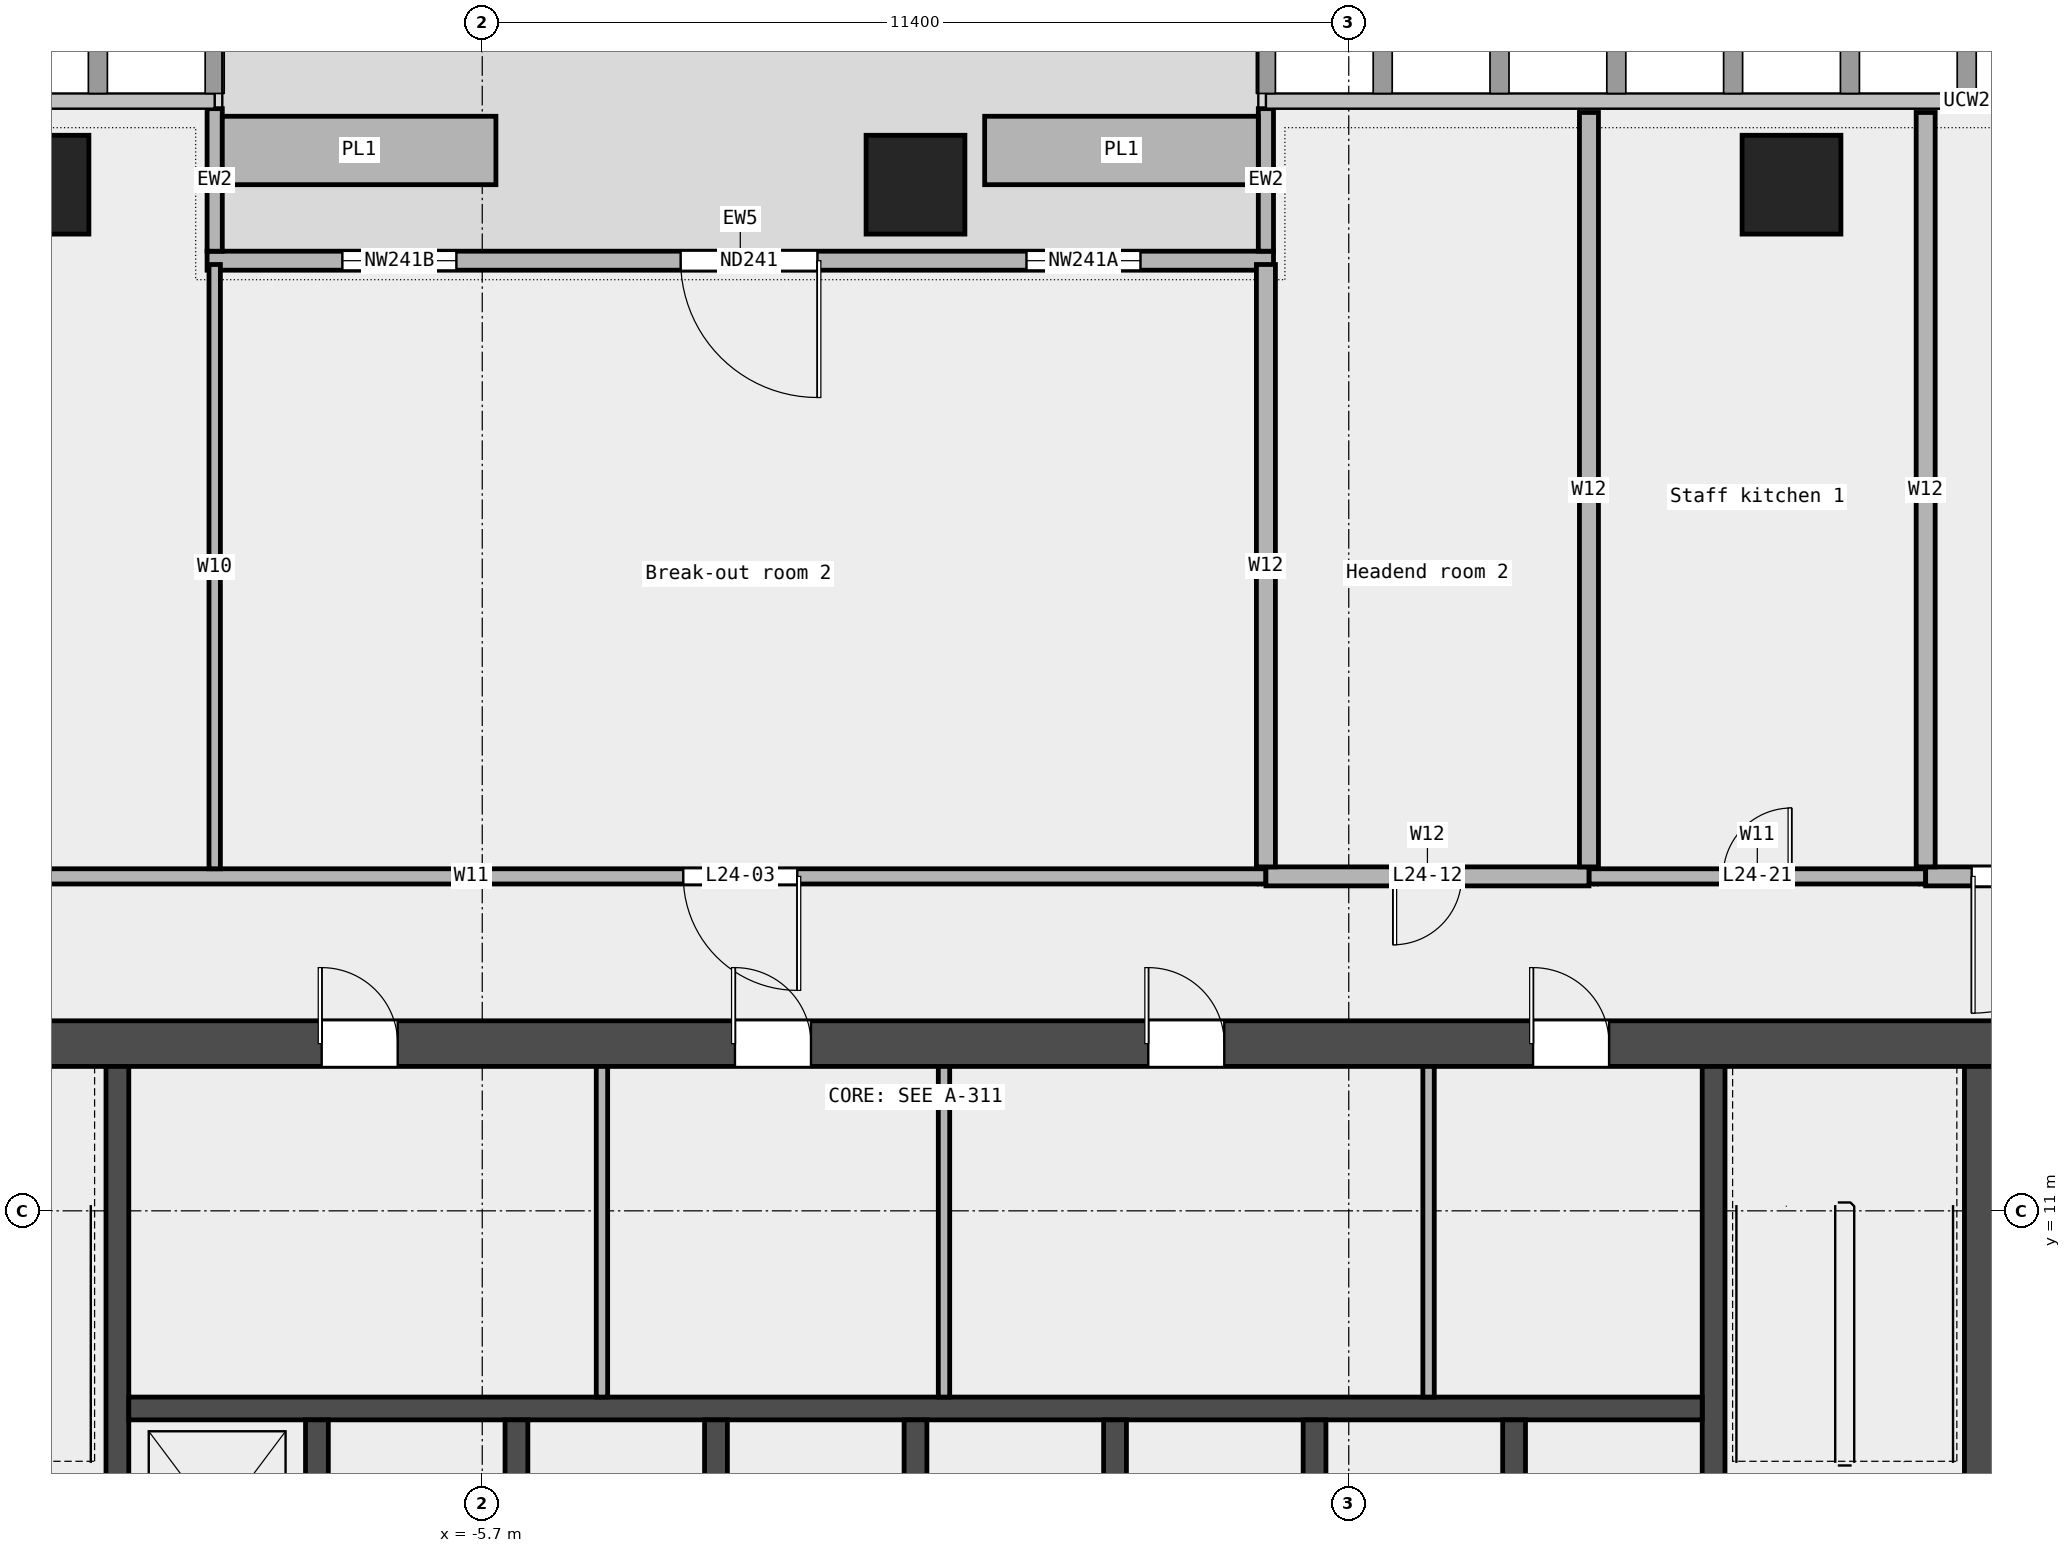
"""IFC4 building model, lengths in metres.
Left out: names, types, materials, properties, quantities, classifications, styles, units other than length and angle.
Written with IfcOpenShell. Run it as: python <this file> out.ifc"""

import sys

from ifc_helpers import new_model, si_unit, direction, frame, frame_2d, origin, origin_2d, place, context, subcontext, project, spatial, rectangle, extrude, element, fill, save


model = new_model("IFC4")
c1 = context("Model", 3, precision=1e-05, world=origin(), true_north=direction((0.0, 1.0)))
c2 = subcontext(c1, "Body", "Model", "MODEL_VIEW")
j1 = project(units=[si_unit("LENGTHUNIT", "METRE"), si_unit("PLANEANGLEUNIT", "RADIAN")], contexts=[c1])
p1 = place(None, origin())
s1 = spatial("IfcSite", under=j1, at=p1, CompositionType="ELEMENT")
p2 = place(p1, origin())
s2 = spatial("IfcBuilding", under=s1, at=p2, CompositionType="ELEMENT")
p3 = place(p2, frame((0.0, 0.0, 121.6)))
s3 = spatial("IfcBuildingStorey", under=s2, at=p3, CompositionType="ELEMENT", Elevation=121.6)
for number, where, z_axis, x_axis in (
    (1, (11.525, 24.5, 0.0), (0.0, 0.0, 1.0), (1.0, 0.0, 0.0)),
    (2, (0.0, 24.5, 0.0), (0.0, 0.0, 1.0), (1.0, 0.0, 0.0)),
    (3, (-11.525, 24.5, 0.0), (0.0, 0.0, 1.0), (1.0, 0.0, 0.0)),
):
    element("IfcColumn", number, at=place(p3, frame(where, z_axis=z_axis, x_axis=x_axis)), inside=s3, PredefinedType="COLUMN", context=c2, shape_type="SweptSolid", body=[
        extrude(rectangle(XDim=1.3, YDim=1.3, at=origin_2d()), origin(), (0.0, 0.0, 1.0), 4.05),
    ])
p4 = place(p3, frame((4.71, 23.5, 0.0), z_axis=(0.0, 0.0, 1.0), x_axis=(-1.0, 0.0, 0.0)))
e4 = element("IfcWall", 4, at=p4, inside=s3, PredefinedType="STANDARD", context=c2, shape_type="SweptSolid", body=[
    extrude(rectangle(XDim=14.03, YDim=0.25, at=frame_2d((7.015, 0.0))), origin(), (0.0, 0.0, 1.0), 4.05),
])
p5 = place(p4, frame((1.75, 0.0, 0.45)))
e5 = element("IfcOpeningElement", 5, at=p5, cuts=e4, PredefinedType="OPENING", context=c2, shape_type="SweptSolid", body=[
    extrude(rectangle(XDim=1.5, YDim=3.0, at=frame_2d((0.75, 1.5))), frame((0.0, 0.137, 0.0), z_axis=(0.0, -1.0, 0.0), x_axis=(1.0, 0.0, 0.0)), (0.0, 0.0, 1.0), 0.274),
])
p6 = place(p4, frame((6.0, 0.0, 0.0)))
e6 = element("IfcOpeningElement", 6, at=p6, cuts=e4, PredefinedType="OPENING", context=c2, shape_type="SweptSolid", body=[
    extrude(rectangle(XDim=1.8, YDim=2.4, at=frame_2d((0.9, 1.2))), frame((0.0, 0.137, 0.0), z_axis=(0.0, -1.0, 0.0), x_axis=(1.0, 0.0, 0.0)), (0.0, 0.0, 1.0), 0.274),
])
p7 = place(p4, frame((10.75, 0.0, 0.45)))
e7 = element("IfcOpeningElement", 7, at=p7, cuts=e4, PredefinedType="OPENING", context=c2, shape_type="SweptSolid", body=[
    extrude(rectangle(XDim=1.5, YDim=3.0, at=frame_2d((0.75, 1.5))), frame((0.0, 0.137, 0.0), z_axis=(0.0, -1.0, 0.0), x_axis=(1.0, 0.0, 0.0)), (0.0, 0.0, 1.0), 0.274),
])
for number, where, z_axis, x_axis in (
    (8, (4.61, 25.5, 0.0), (0.0, 0.0, 1.0), (0.0, -1.0, 0.0)),
    (9, (-9.22, 25.5, 0.0), (0.0, 0.0, 1.0), (0.0, -1.0, 0.0)),
):
    element("IfcWall", number, at=place(p3, frame(where, z_axis=z_axis, x_axis=x_axis)), inside=s3, PredefinedType="STANDARD", context=c2, shape_type="SweptSolid", body=[
        extrude(rectangle(XDim=1.875, YDim=0.2, at=frame_2d((0.938, 0.0))), origin(), (0.0, 0.0, 1.0), 4.05),
    ])
for number, where, z_axis, x_axis in (
    (10, (4.51, 24.95, 0.0), (0.0, 0.0, 1.0), (-1.0, 0.0, 0.0)),
    (11, (-5.52, 24.95, 0.0), (0.0, 0.0, 1.0), (-1.0, 0.0, 0.0)),
):
    element("IfcWall", number, at=place(p3, frame(where, z_axis=z_axis, x_axis=x_axis)), inside=s3, PredefinedType="STANDARD", context=c2, shape_type="SweptSolid", body=[
        extrude(rectangle(XDim=3.6, YDim=0.9, at=frame_2d((1.8, 0.0))), origin(), (0.0, 0.0, 1.0), 0.7),
    ])
p8 = place(p3, frame((-16.3, 15.4, 0.0), z_axis=(0.0, 0.0, 1.0), x_axis=(1.0, 0.0, 0.0)))
e12 = element("IfcWall", 12, at=p8, inside=s3, PredefinedType="PARTITIONING", context=c2, shape_type="SweptSolid", body=[
    extrude(rectangle(XDim=20.91, YDim=0.2, at=frame_2d((10.455, 0.0))), origin(), (0.0, 0.0, 1.0), 4.05),
])
p9 = place(p8, frame((13.245, 0.0, 0.0)))
e13 = element("IfcOpeningElement", 13, at=p9, cuts=e12, PredefinedType="OPENING", context=c2, shape_type="SweptSolid", body=[
    extrude(rectangle(XDim=1.5, YDim=2.1, at=frame_2d((0.75, 1.05))), frame((0.0, 0.112, 0.0), z_axis=(0.0, -1.0, 0.0), x_axis=(1.0, 0.0, 0.0)), (0.0, 0.0, 1.0), 0.224),
])
p10 = place(p8, frame((2.387, 0.0, 0.0)))
e14 = element("IfcOpeningElement", 14, at=p10, cuts=e12, PredefinedType="OPENING", context=c2, shape_type="SweptSolid", body=[
    extrude(rectangle(XDim=1.2, YDim=2.1, at=frame_2d((0.6, 1.05))), frame((0.0, 0.112, 0.0), z_axis=(0.0, -1.0, 0.0), x_axis=(1.0, 0.0, 0.0)), (0.0, 0.0, 1.0), 0.224),
])
p11 = place(p3, frame((8.86, 15.4, 0.0), z_axis=(0.0, 0.0, 1.0), x_axis=(1.0, 0.0, 0.0)))
e15 = element("IfcWall", 15, at=p11, inside=s3, PredefinedType="PARTITIONING", context=c2, shape_type="SweptSolid", body=[
    extrude(rectangle(XDim=4.43, YDim=0.2, at=frame_2d((2.215, 0.0))), origin(), (0.0, 0.0, 1.0), 4.05),
])
p12 = place(p11, frame((1.765, 0.0, 0.0)))
e16 = element("IfcOpeningElement", 16, at=p12, cuts=e15, PredefinedType="OPENING", context=c2, shape_type="SweptSolid", body=[
    extrude(rectangle(XDim=0.9, YDim=2.1, at=frame_2d((0.45, 1.05))), frame((0.0, 0.112, 0.0), z_axis=(0.0, -1.0, 0.0), x_axis=(1.0, 0.0, 0.0)), (0.0, 0.0, 1.0), 0.224),
])
p13 = place(p3, frame((4.61, 15.4, 0.0), z_axis=(0.0, 0.0, 1.0), x_axis=(1.0, 0.0, 0.0)))
e17 = element("IfcWall", 17, at=p13, inside=s3, PredefinedType="PARTITIONING", context=c2, shape_type="SweptSolid", body=[
    extrude(rectangle(XDim=4.25, YDim=0.25, at=frame_2d((2.125, 0.0))), origin(), (0.0, 0.0, 1.0), 4.05),
])
p14 = place(p13, frame((1.675, 0.0, 0.0)))
e18 = element("IfcOpeningElement", 18, at=p14, cuts=e17, PredefinedType="OPENING", context=c2, shape_type="SweptSolid", body=[
    extrude(rectangle(XDim=0.9, YDim=2.1, at=frame_2d((0.45, 1.05))), frame((0.0, 0.137, 0.0), z_axis=(0.0, -1.0, 0.0), x_axis=(1.0, 0.0, 0.0)), (0.0, 0.0, 1.0), 0.274),
])
p15 = place(p3, frame((13.29, 15.4, 0.0), z_axis=(0.0, 0.0, 1.0), x_axis=(1.0, 0.0, 0.0)))
e19 = element("IfcWall", 19, at=p15, inside=s3, PredefinedType="PARTITIONING", context=c2, shape_type="SweptSolid", body=[
    extrude(rectangle(XDim=3.01, YDim=0.25, at=frame_2d((1.505, 0.0))), origin(), (0.0, 0.0, 1.0), 4.05),
])
p16 = place(p15, frame((0.605, 0.0, 0.0)))
e20 = element("IfcOpeningElement", 20, at=p16, cuts=e19, PredefinedType="OPENING", context=c2, shape_type="SweptSolid", body=[
    extrude(rectangle(XDim=1.8, YDim=2.1, at=frame_2d((0.9, 1.05))), frame((0.0, 0.137, 0.0), z_axis=(0.0, -1.0, 0.0), x_axis=(1.0, 0.0, 0.0)), (0.0, 0.0, 1.0), 0.274),
])
p17 = place(p3, frame((-9.22, 15.5, 0.0), z_axis=(0.0, 0.0, 1.0), x_axis=(0.0, 1.0, 0.0)))
e21 = element("IfcWall", 21, at=p17, inside=s3, PredefinedType="PARTITIONING", context=c2, shape_type="SweptSolid", body=[
    extrude(rectangle(XDim=7.95, YDim=0.15, at=frame_2d((3.975, 0.0))), origin(), (0.0, 0.0, 1.0), 4.05),
])
p18 = place(p3, frame((4.61, 15.525, 0.0), z_axis=(0.0, 0.0, 1.0), x_axis=(0.0, 1.0, 0.0)))
e22 = element("IfcWall", 22, at=p18, inside=s3, PredefinedType="PARTITIONING", context=c2, shape_type="SweptSolid", body=[
    extrude(rectangle(XDim=7.925, YDim=0.25, at=frame_2d((3.962, 0.0))), origin(), (0.0, 0.0, 1.0), 4.05),
])
for number, where, z_axis, x_axis in (
    (23, (8.86, 15.525, 0.0), (0.0, 0.0, 1.0), (0.0, 1.0, 0.0)),
    (24, (13.29, 15.525, 0.0), (0.0, 0.0, 1.0), (0.0, 1.0, 0.0)),
):
    element("IfcWall", number, at=place(p3, frame(where, z_axis=z_axis, x_axis=x_axis)), inside=s3, PredefinedType="PARTITIONING", context=c2, shape_type="SweptSolid", body=[
        extrude(rectangle(XDim=9.925, YDim=0.25, at=frame_2d((4.962, 0.0))), origin(), (0.0, 0.0, 1.0), 4.05),
    ])
p19 = place(p3, frame((-14.4, 13.2, 0.0), z_axis=(0.0, 0.0, 1.0), x_axis=(1.0, 0.0, 0.0)))
e25 = element("IfcWall", 25, at=p19, inside=s3, PredefinedType="SHEAR", context=c2, shape_type="SweptSolid", body=[
    extrude(rectangle(XDim=28.8, YDim=0.6, at=frame_2d((14.4, 0.0))), origin(), (0.0, 0.0, 1.0), 4.2),
])
p20 = place(p19, frame((6.587, 0.0, 0.0)))
e26 = element("IfcOpeningElement", 26, at=p20, cuts=e25, PredefinedType="OPENING", context=c2, shape_type="SweptSolid", body=[
    extrude(rectangle(XDim=1.0, YDim=2.1, at=frame_2d((0.5, 1.05))), frame((0.0, 0.312, 0.0), z_axis=(0.0, -1.0, 0.0), x_axis=(1.0, 0.0, 0.0)), (0.0, 0.0, 1.0), 0.624),
])
p21 = place(p19, frame((12.025, 0.0, 0.0)))
e27 = element("IfcOpeningElement", 27, at=p21, cuts=e25, PredefinedType="OPENING", context=c2, shape_type="SweptSolid", body=[
    extrude(rectangle(XDim=1.0, YDim=2.1, at=frame_2d((0.5, 1.05))), frame((0.0, 0.312, 0.0), z_axis=(0.0, -1.0, 0.0), x_axis=(1.0, 0.0, 0.0)), (0.0, 0.0, 1.0), 0.624),
])
p22 = place(p19, frame((17.462, 0.0, 0.0)))
e28 = element("IfcOpeningElement", 28, at=p22, cuts=e25, PredefinedType="OPENING", context=c2, shape_type="SweptSolid", body=[
    extrude(rectangle(XDim=1.0, YDim=2.1, at=frame_2d((0.5, 1.05))), frame((0.0, 0.312, 0.0), z_axis=(0.0, -1.0, 0.0), x_axis=(1.0, 0.0, 0.0)), (0.0, 0.0, 1.0), 0.624),
])
p23 = place(p19, frame((22.525, 0.0, 0.0)))
e29 = element("IfcOpeningElement", 29, at=p23, cuts=e25, PredefinedType="OPENING", context=c2, shape_type="SweptSolid", body=[
    extrude(rectangle(XDim=1.0, YDim=2.1, at=frame_2d((0.5, 1.05))), frame((0.0, 0.312, 0.0), z_axis=(0.0, -1.0, 0.0), x_axis=(1.0, 0.0, 0.0)), (0.0, 0.0, 1.0), 0.624),
])
p24 = place(p3, frame((14.1, -6.6, 0.0), z_axis=(0.0, 0.0, 1.0), x_axis=(0.0, 1.0, 0.0)))
e30 = element("IfcWall", 30, at=p24, inside=s3, PredefinedType="SHEAR", context=c2, shape_type="SweptSolid", body=[
    extrude(rectangle(XDim=19.5, YDim=0.6, at=frame_2d((9.75, 0.0))), origin(), (0.0, 0.0, 1.0), 4.2),
])
p25 = place(p24, frame((9.3, 0.0, 0.0)))
e31 = element("IfcOpeningElement", 31, at=p25, cuts=e30, PredefinedType="OPENING", context=c2, shape_type="SweptSolid", body=[
    extrude(rectangle(XDim=1.8, YDim=2.1, at=frame_2d((0.9, 1.05))), frame((0.0, 0.312, 0.0), z_axis=(0.0, -1.0, 0.0), x_axis=(1.0, 0.0, 0.0)), (0.0, 0.0, 1.0), 0.624),
])
for number, where, z_axis, x_axis in (
    (32, (-10.5, 5.25, 0.0), (0.0, 0.0, 1.0), (0.0, 1.0, 0.0)),
    (33, (10.5, 5.25, 0.0), (0.0, 0.0, 1.0), (0.0, 1.0, 0.0)),
):
    element("IfcWall", number, at=place(p3, frame(where, z_axis=z_axis, x_axis=x_axis)), inside=s3, PredefinedType="SHEAR", context=c2, shape_type="SweptSolid", body=[
        extrude(rectangle(XDim=7.65, YDim=0.3, at=frame_2d((3.825, 0.0))), origin(), (0.0, 0.0, 1.0), 4.2),
    ])
p26 = place(p3, frame((-10.35, 8.4, 0.0), z_axis=(0.0, 0.0, 1.0), x_axis=(1.0, 0.0, 0.0)))
e34 = element("IfcWall", 34, at=p26, inside=s3, PredefinedType="SOLIDWALL", context=c2, shape_type="SweptSolid", body=[
    extrude(rectangle(XDim=20.7, YDim=0.3, at=frame_2d((10.35, 0.0))), origin(), (0.0, 0.0, 1.0), 4.2),
])
for number, where, z_axis, x_axis in (
    (35, (-7.875, 5.55, 0.0), (0.0, 0.0, 1.0), (0.0, 1.0, 0.0)),
    (36, (-5.25, 5.55, 0.0), (0.0, 0.0, 1.0), (0.0, 1.0, 0.0)),
    (37, (-2.625, 5.55, 0.0), (0.0, 0.0, 1.0), (0.0, 1.0, 0.0)),
    (38, (0.0, 5.55, 0.0), (0.0, 0.0, 1.0), (0.0, 1.0, 0.0)),
    (39, (2.625, 5.55, 0.0), (0.0, 0.0, 1.0), (0.0, 1.0, 0.0)),
    (40, (5.25, 5.55, 0.0), (0.0, 0.0, 1.0), (0.0, 1.0, 0.0)),
    (41, (7.875, 5.55, 0.0), (0.0, 0.0, 1.0), (0.0, 1.0, 0.0)),
):
    element("IfcWall", number, at=place(p3, frame(where, z_axis=z_axis, x_axis=x_axis)), inside=s3, PredefinedType="SOLIDWALL", context=c2, shape_type="SweptSolid", body=[
        extrude(rectangle(XDim=2.7, YDim=0.3, at=frame_2d((1.35, 0.0))), origin(), (0.0, 0.0, 1.0), 4.2),
    ])
for number, where, z_axis, x_axis in (
    (42, (-4.125, 8.55, 0.0), (0.0, 0.0, 1.0), (0.0, 1.0, 0.0)),
    (43, (0.375, 8.55, 0.0), (0.0, 0.0, 1.0), (0.0, 1.0, 0.0)),
    (44, (6.75, 8.55, 0.0), (0.0, 0.0, 1.0), (0.0, 1.0, 0.0)),
):
    element("IfcWall", number, at=place(p3, frame(where, z_axis=z_axis, x_axis=x_axis)), inside=s3, PredefinedType="PARTITIONING", context=c2, shape_type="SweptSolid", body=[
        extrude(rectangle(XDim=4.35, YDim=0.15, at=frame_2d((2.175, 0.0))), origin(), (0.0, 0.0, 1.0), 4.2),
    ])
p27 = place(p5, origin())
e45 = element("IfcWindow", 45, at=p27, inside=s3, PartitioningType="SINGLE_PANEL", PredefinedType="WINDOW", context=c2, shape_type="SweptSolid", body=[
    extrude(rectangle(XDim=1.5, YDim=3.0, at=frame_2d((0.75, 1.5))), frame((0.0, 0.03, 0.0), z_axis=(0.0, -1.0, 0.0), x_axis=(1.0, 0.0, 0.0)), (0.0, 0.0, 1.0), 0.06),
])
fill(e5, e45)
p28 = place(p6, origin())
e46 = element("IfcDoor", 46, at=p28, inside=s3, OperationType="DOUBLE_DOOR_SINGLE_SWING", PredefinedType="DOOR", context=c2, shape_type="SweptSolid", body=[
    extrude(rectangle(XDim=1.8, YDim=2.4, at=frame_2d((0.9, 1.2))), frame((0.0, 0.025, 0.0), z_axis=(0.0, -1.0, 0.0), x_axis=(1.0, 0.0, 0.0)), (0.0, 0.0, 1.0), 0.05),
])
fill(e6, e46)
p29 = place(p7, origin())
e47 = element("IfcWindow", 47, at=p29, inside=s3, PartitioningType="SINGLE_PANEL", PredefinedType="WINDOW", context=c2, shape_type="SweptSolid", body=[
    extrude(rectangle(XDim=1.5, YDim=3.0, at=frame_2d((0.75, 1.5))), frame((0.0, 0.03, 0.0), z_axis=(0.0, -1.0, 0.0), x_axis=(1.0, 0.0, 0.0)), (0.0, 0.0, 1.0), 0.06),
])
fill(e7, e47)
p30 = place(p9, origin())
e48 = element("IfcDoor", 48, at=p30, inside=s3, OperationType="DOUBLE_DOOR_SINGLE_SWING", PredefinedType="DOOR", context=c2, shape_type="SweptSolid", body=[
    extrude(rectangle(XDim=1.5, YDim=2.1, at=frame_2d((0.75, 1.05))), frame((0.0, 0.025, 0.0), z_axis=(0.0, -1.0, 0.0), x_axis=(1.0, 0.0, 0.0)), (0.0, 0.0, 1.0), 0.05),
])
fill(e13, e48)
p31 = place(p14, origin())
e49 = element("IfcDoor", 49, at=p31, inside=s3, OperationType="SINGLE_SWING_RIGHT", PredefinedType="DOOR", context=c2, shape_type="SweptSolid", body=[
    extrude(rectangle(XDim=0.9, YDim=2.1, at=frame_2d((0.45, 1.05))), frame((0.0, 0.025, 0.0), z_axis=(0.0, -1.0, 0.0), x_axis=(1.0, 0.0, 0.0)), (0.0, 0.0, 1.0), 0.05),
])
fill(e18, e49)
p32 = place(p16, origin())
e50 = element("IfcDoor", 50, at=p32, inside=s3, OperationType="DOUBLE_DOOR_SINGLE_SWING", PredefinedType="DOOR", context=c2, shape_type="SweptSolid", body=[
    extrude(rectangle(XDim=1.8, YDim=2.1, at=frame_2d((0.9, 1.05))), frame((0.0, 0.025, 0.0), z_axis=(0.0, -1.0, 0.0), x_axis=(1.0, 0.0, 0.0)), (0.0, 0.0, 1.0), 0.05),
])
fill(e20, e50)
p33 = place(p12, origin())
e51 = element("IfcDoor", 51, at=p33, inside=s3, OperationType="SINGLE_SWING_RIGHT", PredefinedType="DOOR", context=c2, shape_type="SweptSolid", body=[
    extrude(rectangle(XDim=0.9, YDim=2.1, at=frame_2d((0.45, 1.05))), frame((0.0, 0.025, 0.0), z_axis=(0.0, -1.0, 0.0), x_axis=(1.0, 0.0, 0.0)), (0.0, 0.0, 1.0), 0.05),
])
fill(e16, e51)
p34 = place(p20, origin())
e52 = element("IfcDoor", 52, at=p34, inside=s3, OperationType="SINGLE_SWING_LEFT", PredefinedType="DOOR", context=c2, shape_type="SweptSolid", body=[
    extrude(rectangle(XDim=1.0, YDim=2.1, at=frame_2d((0.5, 1.05))), frame((0.0, 0.025, 0.0), z_axis=(0.0, -1.0, 0.0), x_axis=(1.0, 0.0, 0.0)), (0.0, 0.0, 1.0), 0.05),
])
fill(e26, e52)
p35 = place(p21, origin())
e53 = element("IfcDoor", 53, at=p35, inside=s3, OperationType="SINGLE_SWING_LEFT", PredefinedType="DOOR", context=c2, shape_type="SweptSolid", body=[
    extrude(rectangle(XDim=1.0, YDim=2.1, at=frame_2d((0.5, 1.05))), frame((0.0, 0.025, 0.0), z_axis=(0.0, -1.0, 0.0), x_axis=(1.0, 0.0, 0.0)), (0.0, 0.0, 1.0), 0.05),
])
fill(e27, e53)
p36 = place(p22, origin())
e54 = element("IfcDoor", 54, at=p36, inside=s3, OperationType="SINGLE_SWING_LEFT", PredefinedType="DOOR", context=c2, shape_type="SweptSolid", body=[
    extrude(rectangle(XDim=1.0, YDim=2.1, at=frame_2d((0.5, 1.05))), frame((0.0, 0.025, 0.0), z_axis=(0.0, -1.0, 0.0), x_axis=(1.0, 0.0, 0.0)), (0.0, 0.0, 1.0), 0.05),
])
fill(e28, e54)
p37 = place(p23, origin())
e55 = element("IfcDoor", 55, at=p37, inside=s3, OperationType="SINGLE_SWING_LEFT", PredefinedType="DOOR", context=c2, shape_type="SweptSolid", body=[
    extrude(rectangle(XDim=1.0, YDim=2.1, at=frame_2d((0.5, 1.05))), frame((0.0, 0.025, 0.0), z_axis=(0.0, -1.0, 0.0), x_axis=(1.0, 0.0, 0.0)), (0.0, 0.0, 1.0), 0.05),
])
fill(e29, e55)
save(model, sys.argv[1])
